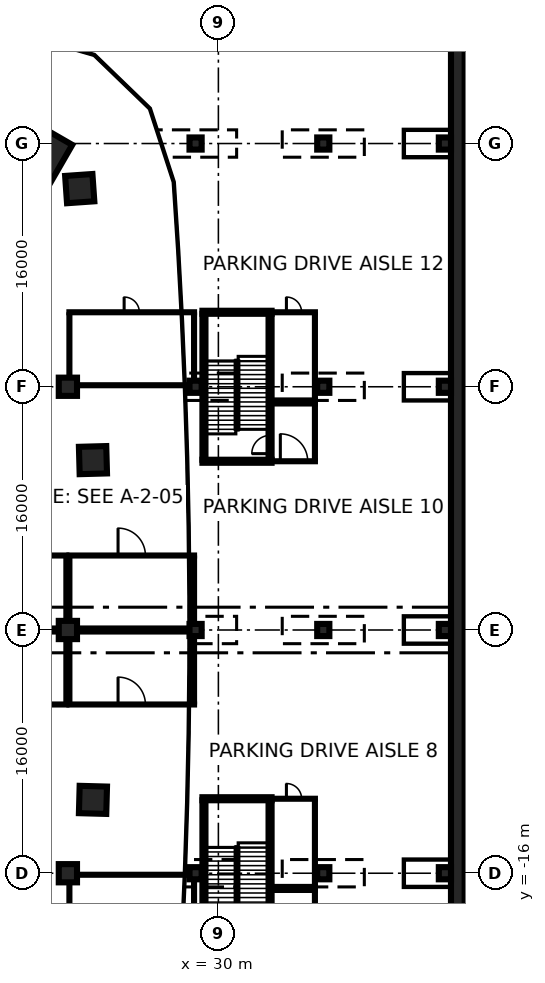
"""IFC4 building model, lengths in metres.
Left out: names, types, materials, properties, quantities, classifications, styles, units other than length and angle.
Written with IfcOpenShell. Run it as: python <this file> out.ifc"""

import sys

from ifc_helpers import new_model, si_unit, direction, frame, frame_2d, origin, origin_2d, place, context, subcontext, project, spatial, rectangle, extrude, element, fill, save


model = new_model("IFC4")
c1 = context("Model", 3, precision=1e-05, world=origin(), true_north=direction((0.0, 1.0)))
c2 = subcontext(c1, "Body", "Model", "MODEL_VIEW")
j1 = project(units=[si_unit("LENGTHUNIT", "METRE"), si_unit("PLANEANGLEUNIT", "RADIAN")], contexts=[c1])
p1 = place(None, origin())
s1 = spatial("IfcSite", under=j1, at=p1, CompositionType="ELEMENT")
p2 = place(p1, origin())
s2 = spatial("IfcBuilding", under=s1, at=p2, CompositionType="ELEMENT")
p3 = place(p2, frame((0.0, 0.0, -12.0)))
s3 = spatial("IfcBuildingStorey", under=s2, at=p3, CompositionType="ELEMENT", Elevation=-12.0)
p4 = place(p3, frame((45.75, -80.0, 0.0), z_axis=(0.0, 0.0, 1.0), x_axis=(0.0, 1.0, 0.0)))
e1 = element("IfcWall", 1, at=p4, inside=s3, PredefinedType="USERDEFINED", context=c2, shape_type="SweptSolid", body=[
    extrude(rectangle(XDim=160.0, YDim=0.9, at=frame_2d((80.0, 0.0))), origin(), (0.0, 0.0, 1.0), 11.55),
])
p5 = place(p3, frame((17.865, 30.942, 0.0), z_axis=(0.0, 0.0, 1.0), x_axis=(0.5, 0.866025403784, 0.0)))
e2 = element("IfcColumn", 2, at=p5, inside=s3, PredefinedType="COLUMN", context=c2, shape_type="SweptSolid", body=[
    extrude(rectangle(XDim=4.2, YDim=3.4, at=origin_2d()), origin(), (0.0, 0.0, 1.0), 4.4),
])
for number, where, z_axis, x_axis in (
    (3, (21.749, -11.174, 0.0), (0.0, 0.0, 1.0), (-1.0, 0.027, 0.0)),
    (4, (21.749, 11.174, 0.0), (0.0, 0.0, 1.0), (1.0, 0.027, 0.0)),
    (5, (20.879, 29.034, 0.0), (0.0, 0.0, 1.0), (0.998, 0.07, 0.0)),
):
    element("IfcColumn", number, at=place(p3, frame(where, z_axis=z_axis, x_axis=x_axis)), inside=s3, PredefinedType="COLUMN", context=c2, shape_type="SweptSolid", body=[
        extrude(rectangle(XDim=1.8, YDim=1.8, at=origin_2d()), origin(), (0.0, 0.0, 1.0), 4.4),
    ])
for number, where, z_axis, x_axis in (
    (6, (20.1, -16.0, 0.0), (0.0, 0.0, 1.0), (1.0, 0.0, 0.0)),
    (7, (20.1, 0.0, 0.0), (0.0, 0.0, 1.0), (1.0, 0.0, 0.0)),
    (8, (20.1, 16.0, 0.0), (0.0, 0.0, 1.0), (1.0, 0.0, 0.0)),
):
    element("IfcColumn", number, at=place(p3, frame(where, z_axis=z_axis, x_axis=x_axis)), inside=s3, PredefinedType="COLUMN", context=c2, shape_type="SweptSolid", body=[
        extrude(rectangle(XDim=1.2, YDim=1.2, at=origin_2d()), origin(), (0.0, 0.0, 1.0), 4.4),
    ])
for number, where, z_axis, x_axis in (
    (9, (28.5, -16.0, 0.0), (0.0, 0.0, 1.0), (1.0, 0.0, 0.0)),
    (10, (28.5, 0.0, 0.0), (0.0, 0.0, 1.0), (1.0, 0.0, 0.0)),
    (11, (28.5, 16.0, 0.0), (0.0, 0.0, 1.0), (1.0, 0.0, 0.0)),
    (12, (28.5, 32.0, 0.0), (0.0, 0.0, 1.0), (1.0, 0.0, 0.0)),
    (13, (36.9, -16.0, 0.0), (0.0, 0.0, 1.0), (1.0, 0.0, 0.0)),
    (14, (36.9, 0.0, 0.0), (0.0, 0.0, 1.0), (1.0, 0.0, 0.0)),
    (15, (36.9, 16.0, 0.0), (0.0, 0.0, 1.0), (1.0, 0.0, 0.0)),
    (16, (36.9, 32.0, 0.0), (0.0, 0.0, 1.0), (1.0, 0.0, 0.0)),
    (17, (44.9, -16.0, 0.0), (0.0, 0.0, 1.0), (1.0, 0.0, 0.0)),
    (18, (44.9, 0.0, 0.0), (0.0, 0.0, 1.0), (1.0, 0.0, 0.0)),
    (19, (44.9, 16.0, 0.0), (0.0, 0.0, 1.0), (1.0, 0.0, 0.0)),
    (20, (44.9, 32.0, 0.0), (0.0, 0.0, 1.0), (1.0, 0.0, 0.0)),
):
    element("IfcColumn", number, at=place(p3, frame(where, z_axis=z_axis, x_axis=x_axis)), inside=s3, PredefinedType="COLUMN", context=c2, shape_type="SweptSolid", body=[
        extrude(rectangle(XDim=0.8, YDim=0.8, at=origin_2d()), origin(), (0.0, 0.0, 1.0), 4.4),
    ])
p6 = place(p3, frame((20.1, -16.1, 0.0), z_axis=(0.0, 0.0, 1.0), x_axis=(1.0, 0.0, 0.0)))
e21 = element("IfcWall", 21, at=p6, inside=s3, PredefinedType="PARTITIONING", context=c2, shape_type="SweptSolid", body=[
    extrude(rectangle(XDim=8.4, YDim=0.2, at=frame_2d((4.2, 0.0))), origin(), (0.0, 0.0, 1.0), 4.4),
])
p7 = place(p3, frame((20.2, -20.8, 0.0), z_axis=(0.0, 0.0, 1.0), x_axis=(0.0, 1.0, 0.0)))
e22 = element("IfcWall", 22, at=p7, inside=s3, PredefinedType="PARTITIONING", context=c2, shape_type="SweptSolid", body=[
    extrude(rectangle(XDim=4.2, YDim=0.2, at=frame_2d((2.1, 0.0))), origin(), (0.0, 0.0, 1.0), 4.4),
])
p8 = place(p3, frame((28.4, -20.8, 0.0), z_axis=(0.0, 0.0, 1.0), x_axis=(0.0, 1.0, 0.0)))
e23 = element("IfcWall", 23, at=p8, inside=s3, PredefinedType="PARTITIONING", context=c2, shape_type="SweptSolid", body=[
    extrude(rectangle(XDim=4.4, YDim=0.2, at=frame_2d((2.2, 0.0))), origin(), (0.0, 0.0, 1.0), 4.4),
])
p9 = place(p3, frame((-5.1, -4.9, 0.0), z_axis=(0.0, 0.0, 1.0), x_axis=(1.0, 0.0, 0.0)))
e24 = element("IfcWall", 24, at=p9, inside=s3, PredefinedType="PARTITIONING", context=c2, shape_type="SweptSolid", body=[
    extrude(rectangle(XDim=25.2, YDim=0.2, at=frame_2d((12.6, 0.0))), origin(), (0.0, 0.0, 1.0), 4.4),
])
p10 = place(p9, frame((3.3, 0.0, 0.0)))
e25 = element("IfcOpeningElement", 25, at=p10, cuts=e24, PredefinedType="OPENING", context=c2, shape_type="SweptSolid", body=[
    extrude(rectangle(XDim=1.8, YDim=2.1, at=frame_2d((0.9, 1.05))), frame((0.0, 0.11, 0.0), z_axis=(0.0, -1.0, 0.0), x_axis=(1.0, 0.0, 0.0)), (0.0, 0.0, 1.0), 0.22),
])
p11 = place(p3, frame((-5.1, -0.1, 0.0), z_axis=(0.0, 0.0, 1.0), x_axis=(1.0, 0.0, 0.0)))
e26 = element("IfcWall", 26, at=p11, inside=s3, PredefinedType="PARTITIONING", context=c2, shape_type="SweptSolid", body=[
    extrude(rectangle(XDim=25.2, YDim=0.2, at=frame_2d((12.6, 0.0))), origin(), (0.0, 0.0, 1.0), 4.4),
])
p12 = place(p3, frame((20.0, -4.8, 0.0), z_axis=(0.0, 0.0, 1.0), x_axis=(0.0, 1.0, 0.0)))
e27 = element("IfcWall", 27, at=p12, inside=s3, PredefinedType="PARTITIONING", context=c2, shape_type="SweptSolid", body=[
    extrude(rectangle(XDim=4.2, YDim=0.2, at=frame_2d((2.1, 0.0))), origin(), (0.0, 0.0, 1.0), 4.4),
])
p13 = place(p3, frame((20.1, -4.9, 0.0), z_axis=(0.0, 0.0, 1.0), x_axis=(1.0, 0.0, 0.0)))
e28 = element("IfcWall", 28, at=p13, inside=s3, PredefinedType="PARTITIONING", context=c2, shape_type="SweptSolid", body=[
    extrude(rectangle(XDim=8.4, YDim=0.2, at=frame_2d((4.2, 0.0))), origin(), (0.0, 0.0, 1.0), 4.4),
])
p14 = place(p13, frame((3.3, 0.0, 0.0)))
e29 = element("IfcOpeningElement", 29, at=p14, cuts=e28, PredefinedType="OPENING", context=c2, shape_type="SweptSolid", body=[
    extrude(rectangle(XDim=1.8, YDim=2.1, at=frame_2d((0.9, 1.05))), frame((0.0, 0.11, 0.0), z_axis=(0.0, -1.0, 0.0), x_axis=(1.0, 0.0, 0.0)), (0.0, 0.0, 1.0), 0.22),
])
p15 = place(p3, frame((20.1, -0.1, 0.0), z_axis=(0.0, 0.0, 1.0), x_axis=(1.0, 0.0, 0.0)))
e30 = element("IfcWall", 30, at=p15, inside=s3, PredefinedType="PARTITIONING", context=c2, shape_type="SweptSolid", body=[
    extrude(rectangle(XDim=8.4, YDim=0.2, at=frame_2d((4.2, 0.0))), origin(), (0.0, 0.0, 1.0), 4.4),
])
p16 = place(p3, frame((20.2, -4.8, 0.0), z_axis=(0.0, 0.0, 1.0), x_axis=(0.0, 1.0, 0.0)))
e31 = element("IfcWall", 31, at=p16, inside=s3, PredefinedType="PARTITIONING", context=c2, shape_type="SweptSolid", body=[
    extrude(rectangle(XDim=4.2, YDim=0.2, at=frame_2d((2.1, 0.0))), origin(), (0.0, 0.0, 1.0), 4.4),
])
p17 = place(p3, frame((28.4, -4.8, 0.0), z_axis=(0.0, 0.0, 1.0), x_axis=(0.0, 1.0, 0.0)))
e32 = element("IfcWall", 32, at=p17, inside=s3, PredefinedType="PARTITIONING", context=c2, shape_type="SweptSolid", body=[
    extrude(rectangle(XDim=4.4, YDim=0.2, at=frame_2d((2.2, 0.0))), origin(), (0.0, 0.0, 1.0), 4.4),
])
p18 = place(p3, frame((3.3, 0.1, 0.0), z_axis=(0.0, 0.0, 1.0), x_axis=(1.0, 0.0, 0.0)))
e33 = element("IfcWall", 33, at=p18, inside=s3, PredefinedType="PARTITIONING", context=c2, shape_type="SweptSolid", body=[
    extrude(rectangle(XDim=16.8, YDim=0.2, at=frame_2d((8.4, 0.0))), origin(), (0.0, 0.0, 1.0), 4.4),
])
p19 = place(p3, frame((3.3, 4.9, 0.0), z_axis=(0.0, 0.0, 1.0), x_axis=(1.0, 0.0, 0.0)))
e34 = element("IfcWall", 34, at=p19, inside=s3, PredefinedType="PARTITIONING", context=c2, shape_type="SweptSolid", body=[
    extrude(rectangle(XDim=16.8, YDim=0.2, at=frame_2d((8.4, 0.0))), origin(), (0.0, 0.0, 1.0), 4.4),
])
p20 = place(p19, frame((3.3, 0.0, 0.0)))
e35 = element("IfcOpeningElement", 35, at=p20, cuts=e34, PredefinedType="OPENING", context=c2, shape_type="SweptSolid", body=[
    extrude(rectangle(XDim=1.8, YDim=2.1, at=frame_2d((0.9, 1.05))), frame((0.0, 0.11, 0.0), z_axis=(0.0, -1.0, 0.0), x_axis=(1.0, 0.0, 0.0)), (0.0, 0.0, 1.0), 0.22),
])
p21 = place(p3, frame((20.0, 0.6, 0.0), z_axis=(0.0, 0.0, 1.0), x_axis=(0.0, 1.0, 0.0)))
e36 = element("IfcWall", 36, at=p21, inside=s3, PredefinedType="PARTITIONING", context=c2, shape_type="SweptSolid", body=[
    extrude(rectangle(XDim=4.2, YDim=0.2, at=frame_2d((2.1, 0.0))), origin(), (0.0, 0.0, 1.0), 4.4),
])
p22 = place(p3, frame((20.1, 0.1, 0.0), z_axis=(0.0, 0.0, 1.0), x_axis=(1.0, 0.0, 0.0)))
e37 = element("IfcWall", 37, at=p22, inside=s3, PredefinedType="PARTITIONING", context=c2, shape_type="SweptSolid", body=[
    extrude(rectangle(XDim=8.4, YDim=0.2, at=frame_2d((4.2, 0.0))), origin(), (0.0, 0.0, 1.0), 4.4),
])
p23 = place(p3, frame((20.1, 4.9, 0.0), z_axis=(0.0, 0.0, 1.0), x_axis=(1.0, 0.0, 0.0)))
e38 = element("IfcWall", 38, at=p23, inside=s3, PredefinedType="PARTITIONING", context=c2, shape_type="SweptSolid", body=[
    extrude(rectangle(XDim=8.4, YDim=0.2, at=frame_2d((4.2, 0.0))), origin(), (0.0, 0.0, 1.0), 4.4),
])
p24 = place(p23, frame((3.3, 0.0, 0.0)))
e39 = element("IfcOpeningElement", 39, at=p24, cuts=e38, PredefinedType="OPENING", context=c2, shape_type="SweptSolid", body=[
    extrude(rectangle(XDim=1.8, YDim=2.1, at=frame_2d((0.9, 1.05))), frame((0.0, 0.11, 0.0), z_axis=(0.0, -1.0, 0.0), x_axis=(1.0, 0.0, 0.0)), (0.0, 0.0, 1.0), 0.22),
])
p25 = place(p3, frame((20.2, 0.6, 0.0), z_axis=(0.0, 0.0, 1.0), x_axis=(0.0, 1.0, 0.0)))
e40 = element("IfcWall", 40, at=p25, inside=s3, PredefinedType="PARTITIONING", context=c2, shape_type="SweptSolid", body=[
    extrude(rectangle(XDim=4.2, YDim=0.2, at=frame_2d((2.1, 0.0))), origin(), (0.0, 0.0, 1.0), 4.4),
])
p26 = place(p3, frame((28.4, 0.4, 0.0), z_axis=(0.0, 0.0, 1.0), x_axis=(0.0, 1.0, 0.0)))
e41 = element("IfcWall", 41, at=p26, inside=s3, PredefinedType="PARTITIONING", context=c2, shape_type="SweptSolid", body=[
    extrude(rectangle(XDim=4.4, YDim=0.2, at=frame_2d((2.2, 0.0))), origin(), (0.0, 0.0, 1.0), 4.4),
])
p27 = place(p3, frame((20.1, 16.1, 0.0), z_axis=(0.0, 0.0, 1.0), x_axis=(1.0, 0.0, 0.0)))
e42 = element("IfcWall", 42, at=p27, inside=s3, PredefinedType="PARTITIONING", context=c2, shape_type="SweptSolid", body=[
    extrude(rectangle(XDim=8.4, YDim=0.2, at=frame_2d((4.2, 0.0))), origin(), (0.0, 0.0, 1.0), 4.4),
])
p28 = place(p3, frame((20.1, 20.9, 0.0), z_axis=(0.0, 0.0, 1.0), x_axis=(1.0, 0.0, 0.0)))
e43 = element("IfcWall", 43, at=p28, inside=s3, PredefinedType="PARTITIONING", context=c2, shape_type="SweptSolid", body=[
    extrude(rectangle(XDim=8.4, YDim=0.2, at=frame_2d((4.2, 0.0))), origin(), (0.0, 0.0, 1.0), 4.4),
])
p29 = place(p28, frame((3.7, 0.0, 0.0)))
e44 = element("IfcOpeningElement", 44, at=p29, cuts=e43, PredefinedType="OPENING", context=c2, shape_type="SweptSolid", body=[
    extrude(rectangle(XDim=1.0, YDim=2.1, at=frame_2d((0.5, 1.05))), frame((0.0, 0.11, 0.0), z_axis=(0.0, -1.0, 0.0), x_axis=(1.0, 0.0, 0.0)), (0.0, 0.0, 1.0), 0.22),
])
p30 = place(p3, frame((20.2, 16.6, 0.0), z_axis=(0.0, 0.0, 1.0), x_axis=(0.0, 1.0, 0.0)))
e45 = element("IfcWall", 45, at=p30, inside=s3, PredefinedType="PARTITIONING", context=c2, shape_type="SweptSolid", body=[
    extrude(rectangle(XDim=4.2, YDim=0.2, at=frame_2d((2.1, 0.0))), origin(), (0.0, 0.0, 1.0), 4.4),
])
p31 = place(p3, frame((28.4, 16.4, 0.0), z_axis=(0.0, 0.0, 1.0), x_axis=(0.0, 1.0, 0.0)))
e46 = element("IfcWall", 46, at=p31, inside=s3, PredefinedType="PARTITIONING", context=c2, shape_type="SweptSolid", body=[
    extrude(rectangle(XDim=4.4, YDim=0.2, at=frame_2d((2.2, 0.0))), origin(), (0.0, 0.0, 1.0), 4.4),
])
p32 = place(p3, frame((33.5, -17.1, 0.0), z_axis=(0.0, 0.0, 1.0), x_axis=(1.0, 0.0, 0.0)))
e47 = element("IfcWall", 47, at=p32, inside=s3, PredefinedType="PARTITIONING", context=c2, shape_type="SweptSolid", body=[
    extrude(rectangle(XDim=2.95, YDim=0.2, at=frame_2d((1.475, 0.0))), origin(), (0.0, 0.0, 1.0), 4.4),
])
p33 = place(p3, frame((36.35, -20.8, 0.0), z_axis=(0.0, 0.0, 1.0), x_axis=(0.0, 1.0, 0.0)))
e48 = element("IfcWall", 48, at=p33, inside=s3, PredefinedType="PARTITIONING", context=c2, shape_type="SweptSolid", body=[
    extrude(rectangle(XDim=3.6, YDim=0.2, at=frame_2d((1.8, 0.0))), origin(), (0.0, 0.0, 1.0), 4.4),
])
p34 = place(p3, frame((33.5, -16.9, 0.0), z_axis=(0.0, 0.0, 1.0), x_axis=(1.0, 0.0, 0.0)))
e49 = element("IfcWall", 49, at=p34, inside=s3, PredefinedType="PARTITIONING", context=c2, shape_type="SweptSolid", body=[
    extrude(rectangle(XDim=2.95, YDim=0.2, at=frame_2d((1.475, 0.0))), origin(), (0.0, 0.0, 1.0), 4.4),
])
p35 = place(p3, frame((33.5, -11.1, 0.0), z_axis=(0.0, 0.0, 1.0), x_axis=(1.0, 0.0, 0.0)))
e50 = element("IfcWall", 50, at=p35, inside=s3, PredefinedType="PARTITIONING", context=c2, shape_type="SweptSolid", body=[
    extrude(rectangle(XDim=2.95, YDim=0.2, at=frame_2d((1.475, 0.0))), origin(), (0.0, 0.0, 1.0), 4.4),
])
p36 = place(p35, frame((0.975, 0.0, 0.0)))
e51 = element("IfcOpeningElement", 51, at=p36, cuts=e50, PredefinedType="OPENING", context=c2, shape_type="SweptSolid", body=[
    extrude(rectangle(XDim=1.0, YDim=2.1, at=frame_2d((0.5, 1.05))), frame((0.0, 0.11, 0.0), z_axis=(0.0, -1.0, 0.0), x_axis=(1.0, 0.0, 0.0)), (0.0, 0.0, 1.0), 0.22),
])
p37 = place(p3, frame((36.35, -16.8, 0.0), z_axis=(0.0, 0.0, 1.0), x_axis=(0.0, 1.0, 0.0)))
e52 = element("IfcWall", 52, at=p37, inside=s3, PredefinedType="PARTITIONING", context=c2, shape_type="SweptSolid", body=[
    extrude(rectangle(XDim=5.6, YDim=0.2, at=frame_2d((2.8, 0.0))), origin(), (0.0, 0.0, 1.0), 4.4),
])
p38 = place(p3, frame((33.5, 11.1, 0.0), z_axis=(0.0, 0.0, 1.0), x_axis=(1.0, 0.0, 0.0)))
e53 = element("IfcWall", 53, at=p38, inside=s3, PredefinedType="PARTITIONING", context=c2, shape_type="SweptSolid", body=[
    extrude(rectangle(XDim=2.95, YDim=0.2, at=frame_2d((1.475, 0.0))), origin(), (0.0, 0.0, 1.0), 4.4),
])
p39 = place(p38, frame((0.575, 0.0, 0.0)))
e54 = element("IfcOpeningElement", 54, at=p39, cuts=e53, PredefinedType="OPENING", context=c2, shape_type="SweptSolid", body=[
    extrude(rectangle(XDim=1.8, YDim=2.1, at=frame_2d((0.9, 1.05))), frame((0.0, 0.11, 0.0), z_axis=(0.0, -1.0, 0.0), x_axis=(1.0, 0.0, 0.0)), (0.0, 0.0, 1.0), 0.22),
])
p40 = place(p3, frame((33.5, 14.9, 0.0), z_axis=(0.0, 0.0, 1.0), x_axis=(1.0, 0.0, 0.0)))
e55 = element("IfcWall", 55, at=p40, inside=s3, PredefinedType="PARTITIONING", context=c2, shape_type="SweptSolid", body=[
    extrude(rectangle(XDim=2.95, YDim=0.2, at=frame_2d((1.475, 0.0))), origin(), (0.0, 0.0, 1.0), 4.4),
])
p41 = place(p3, frame((36.35, 11.2, 0.0), z_axis=(0.0, 0.0, 1.0), x_axis=(0.0, 1.0, 0.0)))
e56 = element("IfcWall", 56, at=p41, inside=s3, PredefinedType="PARTITIONING", context=c2, shape_type="SweptSolid", body=[
    extrude(rectangle(XDim=3.6, YDim=0.2, at=frame_2d((1.8, 0.0))), origin(), (0.0, 0.0, 1.0), 4.4),
])
p42 = place(p3, frame((33.5, 15.1, 0.0), z_axis=(0.0, 0.0, 1.0), x_axis=(1.0, 0.0, 0.0)))
e57 = element("IfcWall", 57, at=p42, inside=s3, PredefinedType="PARTITIONING", context=c2, shape_type="SweptSolid", body=[
    extrude(rectangle(XDim=2.95, YDim=0.2, at=frame_2d((1.475, 0.0))), origin(), (0.0, 0.0, 1.0), 4.4),
])
p43 = place(p3, frame((33.5, 20.9, 0.0), z_axis=(0.0, 0.0, 1.0), x_axis=(1.0, 0.0, 0.0)))
e58 = element("IfcWall", 58, at=p43, inside=s3, PredefinedType="PARTITIONING", context=c2, shape_type="SweptSolid", body=[
    extrude(rectangle(XDim=2.95, YDim=0.2, at=frame_2d((1.475, 0.0))), origin(), (0.0, 0.0, 1.0), 4.4),
])
p44 = place(p43, frame((0.975, 0.0, 0.0)))
e59 = element("IfcOpeningElement", 59, at=p44, cuts=e58, PredefinedType="OPENING", context=c2, shape_type="SweptSolid", body=[
    extrude(rectangle(XDim=1.0, YDim=2.1, at=frame_2d((0.5, 1.05))), frame((0.0, 0.11, 0.0), z_axis=(0.0, -1.0, 0.0), x_axis=(1.0, 0.0, 0.0)), (0.0, 0.0, 1.0), 0.22),
])
p45 = place(p3, frame((36.35, 15.2, 0.0), z_axis=(0.0, 0.0, 1.0), x_axis=(0.0, 1.0, 0.0)))
e60 = element("IfcWall", 60, at=p45, inside=s3, PredefinedType="PARTITIONING", context=c2, shape_type="SweptSolid", body=[
    extrude(rectangle(XDim=5.6, YDim=0.2, at=frame_2d((2.8, 0.0))), origin(), (0.0, 0.0, 1.0), 4.4),
])
p46 = place(p3, frame((29.05, -20.8, 0.0), z_axis=(0.0, 0.0, 1.0), x_axis=(0.0, 1.0, 0.0)))
e61 = element("IfcWall", 61, at=p46, inside=s3, PredefinedType="SOLIDWALL", context=c2, shape_type="SweptSolid", body=[
    extrude(rectangle(XDim=9.6, YDim=0.2, at=frame_2d((4.8, 0.0))), origin(), (0.0, 0.0, 1.0), 4.4),
])
p47 = place(p3, frame((33.4, -20.8, 0.0), z_axis=(0.0, 0.0, 1.0), x_axis=(0.0, 1.0, 0.0)))
e62 = element("IfcWall", 62, at=p47, inside=s3, PredefinedType="SOLIDWALL", context=c2, shape_type="SweptSolid", body=[
    extrude(rectangle(XDim=9.6, YDim=0.2, at=frame_2d((4.8, 0.0))), origin(), (0.0, 0.0, 1.0), 4.4),
])
p48 = place(p47, frame((0.4, 0.0, 0.0)))
e63 = element("IfcOpeningElement", 63, at=p48, cuts=e62, PredefinedType="OPENING", context=c2, shape_type="SweptSolid", body=[
    extrude(rectangle(XDim=1.2, YDim=2.1, at=frame_2d((0.6, 1.05))), frame((0.0, 0.11, 0.0), z_axis=(0.0, -1.0, 0.0), x_axis=(1.0, 0.0, 0.0)), (0.0, 0.0, 1.0), 0.22),
])
p49 = place(p3, frame((28.95, -11.1, 0.0), z_axis=(0.0, 0.0, 1.0), x_axis=(1.0, 0.0, 0.0)))
e64 = element("IfcWall", 64, at=p49, inside=s3, PredefinedType="SOLIDWALL", context=c2, shape_type="SweptSolid", body=[
    extrude(rectangle(XDim=4.55, YDim=0.2, at=frame_2d((2.275, 0.0))), origin(), (0.0, 0.0, 1.0), 4.4),
])
p50 = place(p3, frame((29.05, 11.2, 0.0), z_axis=(0.0, 0.0, 1.0), x_axis=(0.0, 1.0, 0.0)))
e65 = element("IfcWall", 65, at=p50, inside=s3, PredefinedType="SOLIDWALL", context=c2, shape_type="SweptSolid", body=[
    extrude(rectangle(XDim=9.6, YDim=0.2, at=frame_2d((4.8, 0.0))), origin(), (0.0, 0.0, 1.0), 4.4),
])
p51 = place(p3, frame((33.4, 11.2, 0.0), z_axis=(0.0, 0.0, 1.0), x_axis=(0.0, 1.0, 0.0)))
e66 = element("IfcWall", 66, at=p51, inside=s3, PredefinedType="SOLIDWALL", context=c2, shape_type="SweptSolid", body=[
    extrude(rectangle(XDim=9.6, YDim=0.2, at=frame_2d((4.8, 0.0))), origin(), (0.0, 0.0, 1.0), 4.4),
])
p52 = place(p51, frame((0.4, 0.0, 0.0)))
e67 = element("IfcOpeningElement", 67, at=p52, cuts=e66, PredefinedType="OPENING", context=c2, shape_type="SweptSolid", body=[
    extrude(rectangle(XDim=1.2, YDim=2.1, at=frame_2d((0.6, 1.05))), frame((0.0, 0.11, 0.0), z_axis=(0.0, -1.0, 0.0), x_axis=(1.0, 0.0, 0.0)), (0.0, 0.0, 1.0), 0.22),
])
for number, where, z_axis, x_axis in (
    (68, (33.5, 11.1, 0.0), (0.0, 0.0, 1.0), (-1.0, 0.0, 0.0)),
    (69, (28.95, 20.9, 0.0), (0.0, 0.0, 1.0), (1.0, 0.0, 0.0)),
):
    element("IfcWall", number, at=place(p3, frame(where, z_axis=z_axis, x_axis=x_axis)), inside=s3, PredefinedType="SOLIDWALL", context=c2, shape_type="SweptSolid", body=[
        extrude(rectangle(XDim=4.55, YDim=0.2, at=frame_2d((2.275, 0.0))), origin(), (0.0, 0.0, 1.0), 4.4),
    ])
p53 = place(p14, origin())
e70 = element("IfcDoor", 70, at=p53, inside=s3, OperationType="DOUBLE_DOOR_SINGLE_SWING", PredefinedType="DOOR", context=c2, shape_type="SweptSolid", body=[
    extrude(rectangle(XDim=1.8, YDim=2.1, at=frame_2d((0.9, 1.05))), frame((0.0, 0.025, 0.0), z_axis=(0.0, -1.0, 0.0), x_axis=(1.0, 0.0, 0.0)), (0.0, 0.0, 1.0), 0.05),
])
fill(e29, e70)
p54 = place(p24, origin())
e71 = element("IfcDoor", 71, at=p54, inside=s3, OperationType="DOUBLE_DOOR_SINGLE_SWING", PredefinedType="DOOR", context=c2, shape_type="SweptSolid", body=[
    extrude(rectangle(XDim=1.8, YDim=2.1, at=frame_2d((0.9, 1.05))), frame((0.0, 0.025, 0.0), z_axis=(0.0, -1.0, 0.0), x_axis=(1.0, 0.0, 0.0)), (0.0, 0.0, 1.0), 0.05),
])
fill(e39, e71)
p55 = place(p29, origin())
e72 = element("IfcDoor", 72, at=p55, inside=s3, OperationType="SINGLE_SWING_LEFT", PredefinedType="DOOR", context=c2, shape_type="SweptSolid", body=[
    extrude(rectangle(XDim=1.0, YDim=2.1, at=frame_2d((0.5, 1.05))), frame((0.0, 0.025, 0.0), z_axis=(0.0, -1.0, 0.0), x_axis=(1.0, 0.0, 0.0)), (0.0, 0.0, 1.0), 0.05),
])
fill(e44, e72)
p56 = place(p36, origin())
e73 = element("IfcDoor", 73, at=p56, inside=s3, OperationType="SINGLE_SWING_LEFT", PredefinedType="DOOR", context=c2, shape_type="SweptSolid", body=[
    extrude(rectangle(XDim=1.0, YDim=2.1, at=frame_2d((0.5, 1.05))), frame((0.0, 0.025, 0.0), z_axis=(0.0, -1.0, 0.0), x_axis=(1.0, 0.0, 0.0)), (0.0, 0.0, 1.0), 0.05),
])
fill(e51, e73)
p57 = place(p39, origin())
e74 = element("IfcDoor", 74, at=p57, inside=s3, OperationType="DOUBLE_DOOR_SINGLE_SWING", PredefinedType="DOOR", context=c2, shape_type="SweptSolid", body=[
    extrude(rectangle(XDim=1.8, YDim=2.1, at=frame_2d((0.9, 1.05))), frame((0.0, 0.025, 0.0), z_axis=(0.0, -1.0, 0.0), x_axis=(1.0, 0.0, 0.0)), (0.0, 0.0, 1.0), 0.05),
])
fill(e54, e74)
p58 = place(p44, origin())
e75 = element("IfcDoor", 75, at=p58, inside=s3, OperationType="SINGLE_SWING_LEFT", PredefinedType="DOOR", context=c2, shape_type="SweptSolid", body=[
    extrude(rectangle(XDim=1.0, YDim=2.1, at=frame_2d((0.5, 1.05))), frame((0.0, 0.025, 0.0), z_axis=(0.0, -1.0, 0.0), x_axis=(1.0, 0.0, 0.0)), (0.0, 0.0, 1.0), 0.05),
])
fill(e59, e75)
p59 = place(p52, origin())
e76 = element("IfcDoor", 76, at=p59, inside=s3, OperationType="SINGLE_SWING_LEFT", PredefinedType="DOOR", context=c2, shape_type="SweptSolid", body=[
    extrude(rectangle(XDim=1.2, YDim=2.1, at=frame_2d((0.6, 1.05))), frame((0.0, 0.025, 0.0), z_axis=(0.0, -1.0, 0.0), x_axis=(1.0, 0.0, 0.0)), (0.0, 0.0, 1.0), 0.05),
])
fill(e67, e76)
save(model, sys.argv[1])
